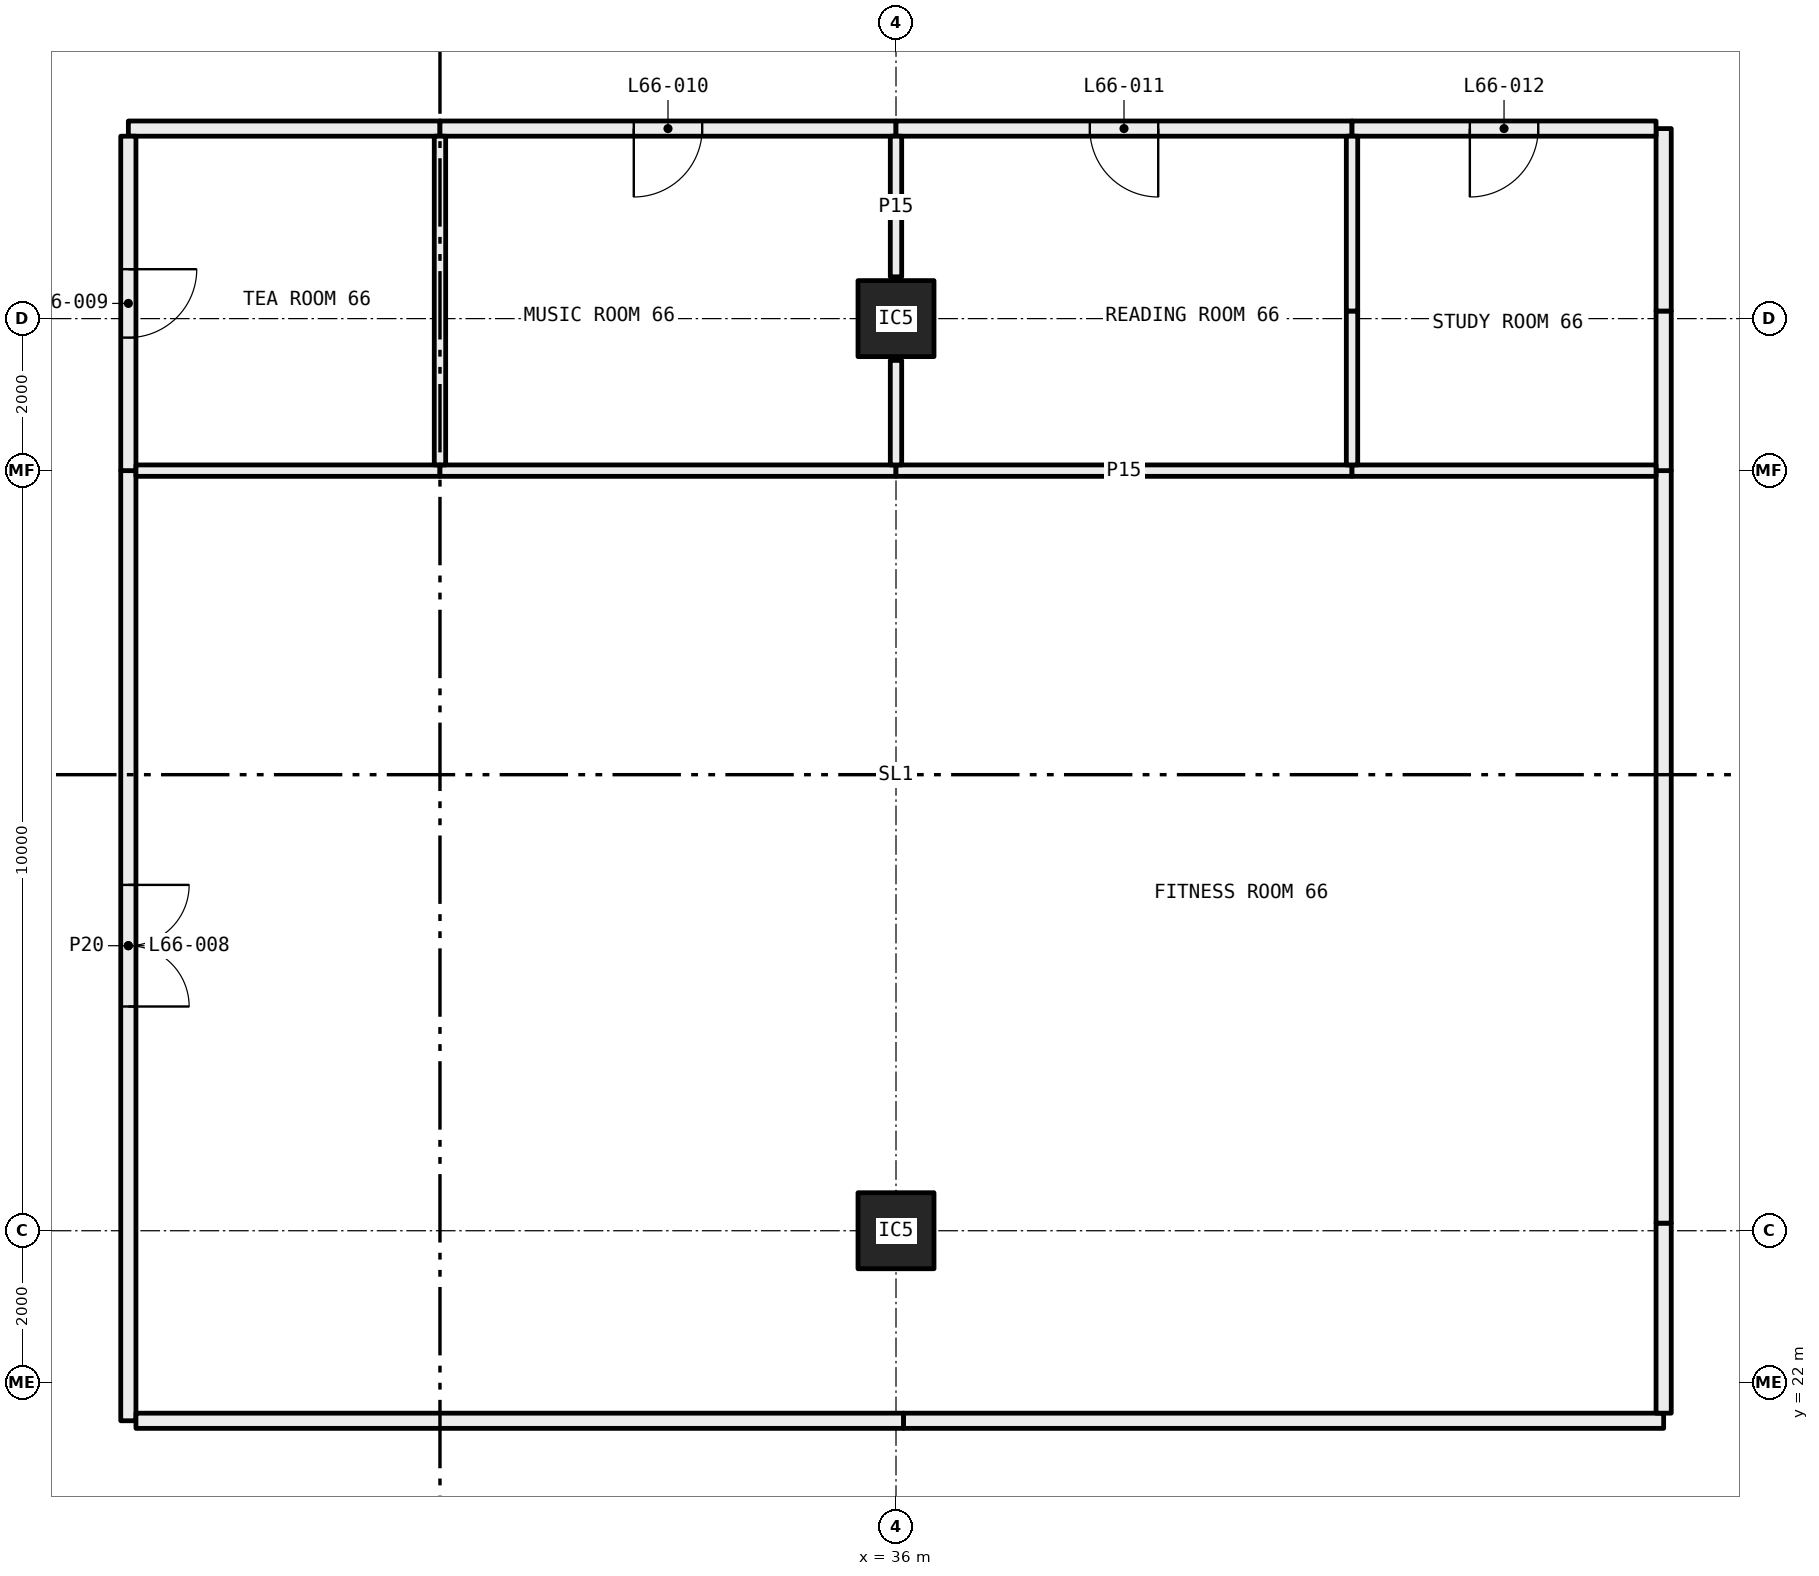
"""IFC4 building model, lengths in metres.
Left out: names, types, materials, properties, quantities, classifications, styles, units other than length and angle.
Written with IfcOpenShell. Run it as: python <this file> out.ifc"""

import sys

from ifc_helpers import new_model, si_unit, direction, frame, frame_2d, origin, origin_2d, place, context, subcontext, project, spatial, rectangle, hollow_rectangle, extrude, element, fill, save


model = new_model("IFC4")
c1 = context("Model", 3, precision=1e-05, world=origin(), true_north=direction((0.0, 1.0)))
c2 = subcontext(c1, "Body", "Model", "MODEL_VIEW")
j1 = project(units=[si_unit("LENGTHUNIT", "METRE"), si_unit("PLANEANGLEUNIT", "RADIAN")], contexts=[c1])
p1 = place(None, origin())
s1 = spatial("IfcSite", under=j1, at=p1, CompositionType="ELEMENT")
p2 = place(p1, origin())
s2 = spatial("IfcBuilding", under=s1, at=p2, CompositionType="ELEMENT")
p3 = place(p2, frame((0.0, 0.0, 245.55)))
s3 = spatial("IfcBuildingStorey", under=s2, at=p3, CompositionType="ELEMENT", Elevation=245.55)
for number, where, z_axis, x_axis in (
    (1, (36.0, 24.0, 0.0), (0.0, 0.0, 1.0), (1.0, 0.0, 0.0)),
    (2, (36.0, 36.0, 0.0), (0.0, 0.0, 1.0), (1.0, 0.0, 0.0)),
):
    element("IfcColumn", number, at=place(p3, frame(where, z_axis=z_axis, x_axis=x_axis)), inside=s3, PredefinedType="COLUMN", context=c2, shape_type="SweptSolid", body=[
        extrude(hollow_rectangle(XDim=1.0, YDim=1.0, WallThickness=0.04, at=origin_2d()), origin(), (0.0, 0.0, 1.0), 3.05),
    ])
p4 = place(p3, frame((25.9, 34.0, 0.0), z_axis=(0.0, 0.0, 1.0), x_axis=(0.0, -1.0, 0.0)))
e3 = element("IfcWall", 3, at=p4, inside=s3, PredefinedType="PARTITIONING", context=c2, shape_type="SweptSolid", body=[
    extrude(rectangle(XDim=12.5, YDim=0.2, at=frame_2d((6.25, 0.0))), origin(), (0.0, 0.0, 1.0), 3.05),
])
p5 = place(p4, frame((5.45, 0.0, 0.0)))
e4 = element("IfcOpeningElement", 4, at=p5, cuts=e3, PredefinedType="OPENING", context=c2, shape_type="SweptSolid", body=[
    extrude(rectangle(XDim=1.6, YDim=2.1, at=frame_2d((0.8, 1.05))), frame((0.0, 0.11, 0.0), z_axis=(0.0, -1.0, 0.0), x_axis=(1.0, 0.0, 0.0)), (0.0, 0.0, 1.0), 0.22),
])
p6 = place(p3, frame((26.0, 21.5, 0.0), z_axis=(0.0, 0.0, 1.0), x_axis=(1.0, 0.0, 0.0)))
e5 = element("IfcWall", 5, at=p6, inside=s3, PredefinedType="PARTITIONING", context=c2, shape_type="SweptSolid", body=[
    extrude(rectangle(XDim=10.1, YDim=0.2, at=frame_2d((5.05, 0.0))), origin(), (0.0, 0.0, 1.0), 2.45),
])
p7 = place(p3, frame((36.1, 21.5, 0.0), z_axis=(0.0, 0.0, 1.0), x_axis=(1.0, 0.0, 0.0)))
e6 = element("IfcWall", 6, at=p7, inside=s3, PredefinedType="PARTITIONING", context=c2, shape_type="SweptSolid", body=[
    extrude(rectangle(XDim=10.0, YDim=0.2, at=frame_2d((5.0, 0.0))), origin(), (0.0, 0.0, 1.0), 3.05),
])
p8 = place(p3, frame((46.1, 21.6, 0.0), z_axis=(0.0, 0.0, 1.0), x_axis=(0.0, 1.0, 0.0)))
e7 = element("IfcWall", 7, at=p8, inside=s3, PredefinedType="PARTITIONING", context=c2, shape_type="SweptSolid", body=[
    extrude(rectangle(XDim=2.5, YDim=0.2, at=frame_2d((1.25, 0.0))), origin(), (0.0, 0.0, 1.0), 2.45),
])
p9 = place(p3, frame((46.1, 24.1, 0.0), z_axis=(0.0, 0.0, 1.0), x_axis=(0.0, 1.0, 0.0)))
e8 = element("IfcWall", 8, at=p9, inside=s3, PredefinedType="PARTITIONING", context=c2, shape_type="SweptSolid", body=[
    extrude(rectangle(XDim=9.9, YDim=0.2, at=frame_2d((4.95, 0.0))), origin(), (0.0, 0.0, 1.0), 3.05),
])
p10 = place(p3, frame((30.0, 38.5, 0.0), z_axis=(0.0, 0.0, 1.0), x_axis=(-1.0, 0.0, 0.0)))
e9 = element("IfcWall", 9, at=p10, inside=s3, PredefinedType="PARTITIONING", context=c2, shape_type="SweptSolid", body=[
    extrude(rectangle(XDim=4.1, YDim=0.2, at=frame_2d((2.05, 0.0))), origin(), (0.0, 0.0, 1.0), 3.05),
])
p11 = place(p3, frame((25.9, 38.4, 0.0), z_axis=(0.0, 0.0, 1.0), x_axis=(0.0, -1.0, 0.0)))
e10 = element("IfcWall", 10, at=p11, inside=s3, PredefinedType="PARTITIONING", context=c2, shape_type="SweptSolid", body=[
    extrude(rectangle(XDim=4.4, YDim=0.2, at=frame_2d((2.2, 0.0))), origin(), (0.0, 0.0, 1.0), 3.05),
])
p12 = place(p11, frame((1.75, 0.0, 0.0)))
e11 = element("IfcOpeningElement", 11, at=p12, cuts=e10, PredefinedType="OPENING", context=c2, shape_type="SweptSolid", body=[
    extrude(rectangle(XDim=0.9, YDim=2.1, at=frame_2d((0.45, 1.05))), frame((0.0, 0.11, 0.0), z_axis=(0.0, -1.0, 0.0), x_axis=(1.0, 0.0, 0.0)), (0.0, 0.0, 1.0), 0.22),
])
p13 = place(p3, frame((36.0, 38.5, 0.0), z_axis=(0.0, 0.0, 1.0), x_axis=(-1.0, 0.0, 0.0)))
e12 = element("IfcWall", 12, at=p13, inside=s3, PredefinedType="PARTITIONING", context=c2, shape_type="SweptSolid", body=[
    extrude(rectangle(XDim=6.0, YDim=0.2, at=frame_2d((3.0, 0.0))), origin(), (0.0, 0.0, 1.0), 2.45),
])
p14 = place(p13, frame((2.55, 0.0, 0.0)))
e13 = element("IfcOpeningElement", 13, at=p14, cuts=e12, PredefinedType="OPENING", context=c2, shape_type="SweptSolid", body=[
    extrude(rectangle(XDim=0.9, YDim=2.1, at=frame_2d((0.45, 1.05))), frame((0.0, 0.11, 0.0), z_axis=(0.0, -1.0, 0.0), x_axis=(1.0, 0.0, 0.0)), (0.0, 0.0, 1.0), 0.22),
])
p15 = place(p3, frame((42.0, 38.5, 0.0), z_axis=(0.0, 0.0, 1.0), x_axis=(-1.0, 0.0, 0.0)))
e14 = element("IfcWall", 14, at=p15, inside=s3, PredefinedType="PARTITIONING", context=c2, shape_type="SweptSolid", body=[
    extrude(rectangle(XDim=6.0, YDim=0.2, at=frame_2d((3.0, 0.0))), origin(), (0.0, 0.0, 1.0), 2.45),
])
p16 = place(p15, frame((2.55, 0.0, 0.0)))
e15 = element("IfcOpeningElement", 15, at=p16, cuts=e14, PredefinedType="OPENING", context=c2, shape_type="SweptSolid", body=[
    extrude(rectangle(XDim=0.9, YDim=2.1, at=frame_2d((0.45, 1.05))), frame((0.0, 0.11, 0.0), z_axis=(0.0, -1.0, 0.0), x_axis=(1.0, 0.0, 0.0)), (0.0, 0.0, 1.0), 0.22),
])
p17 = place(p3, frame((46.1, 34.0, 0.0), z_axis=(0.0, 0.0, 1.0), x_axis=(0.0, 1.0, 0.0)))
e16 = element("IfcWall", 16, at=p17, inside=s3, PredefinedType="PARTITIONING", context=c2, shape_type="SweptSolid", body=[
    extrude(rectangle(XDim=2.1, YDim=0.2, at=frame_2d((1.05, 0.0))), origin(), (0.0, 0.0, 1.0), 2.45),
])
p18 = place(p3, frame((46.1, 36.1, 0.0), z_axis=(0.0, 0.0, 1.0), x_axis=(0.0, 1.0, 0.0)))
e17 = element("IfcWall", 17, at=p18, inside=s3, PredefinedType="PARTITIONING", context=c2, shape_type="SweptSolid", body=[
    extrude(rectangle(XDim=2.4, YDim=0.2, at=frame_2d((1.2, 0.0))), origin(), (0.0, 0.0, 1.0), 3.05),
])
p19 = place(p3, frame((46.0, 38.5, 0.0), z_axis=(0.0, 0.0, 1.0), x_axis=(-1.0, 0.0, 0.0)))
e18 = element("IfcWall", 18, at=p19, inside=s3, PredefinedType="PARTITIONING", context=c2, shape_type="SweptSolid", body=[
    extrude(rectangle(XDim=4.0, YDim=0.2, at=frame_2d((2.0, 0.0))), origin(), (0.0, 0.0, 1.0), 3.05),
])
p20 = place(p19, frame((1.55, 0.0, 0.0)))
e19 = element("IfcOpeningElement", 19, at=p20, cuts=e18, PredefinedType="OPENING", context=c2, shape_type="SweptSolid", body=[
    extrude(rectangle(XDim=0.9, YDim=2.1, at=frame_2d((0.45, 1.05))), frame((0.0, 0.11, 0.0), z_axis=(0.0, -1.0, 0.0), x_axis=(1.0, 0.0, 0.0)), (0.0, 0.0, 1.0), 0.22),
])
p21 = place(p3, frame((30.0, 34.0, 0.0), z_axis=(0.0, 0.0, 1.0), x_axis=(-1.0, 0.0, 0.0)))
e20 = element("IfcWall", 20, at=p21, inside=s3, PredefinedType="PARTITIONING", context=c2, shape_type="SweptSolid", body=[
    extrude(rectangle(XDim=4.0, YDim=0.15, at=frame_2d((2.0, 0.0))), origin(), (0.0, 0.0, 1.0), 3.05),
])
for number, where, z_axis, x_axis in (
    (21, (36.0, 34.0, 0.0), (0.0, 0.0, 1.0), (-1.0, 0.0, 0.0)),
    (22, (42.0, 34.0, 0.0), (0.0, 0.0, 1.0), (-1.0, 0.0, 0.0)),
):
    element("IfcWall", number, at=place(p3, frame(where, z_axis=z_axis, x_axis=x_axis)), inside=s3, PredefinedType="PARTITIONING", context=c2, shape_type="SweptSolid", body=[
        extrude(rectangle(XDim=6.0, YDim=0.15, at=frame_2d((3.0, 0.0))), origin(), (0.0, 0.0, 1.0), 2.45),
    ])
p22 = place(p3, frame((46.0, 34.0, 0.0), z_axis=(0.0, 0.0, 1.0), x_axis=(-1.0, 0.0, 0.0)))
e23 = element("IfcWall", 23, at=p22, inside=s3, PredefinedType="PARTITIONING", context=c2, shape_type="SweptSolid", body=[
    extrude(rectangle(XDim=4.0, YDim=0.15, at=frame_2d((2.0, 0.0))), origin(), (0.0, 0.0, 1.0), 3.05),
])
p23 = place(p3, frame((30.0, 34.075, 0.0), z_axis=(0.0, 0.0, 1.0), x_axis=(0.0, 1.0, 0.0)))
e24 = element("IfcWall", 24, at=p23, inside=s3, PredefinedType="PARTITIONING", context=c2, shape_type="SweptSolid", body=[
    extrude(rectangle(XDim=4.325, YDim=0.15, at=frame_2d((2.163, 0.0))), origin(), (0.0, 0.0, 1.0), 3.05),
])
p24 = place(p3, frame((36.0, 34.075, 0.0), z_axis=(0.0, 0.0, 1.0), x_axis=(0.0, 1.0, 0.0)))
e25 = element("IfcWall", 25, at=p24, inside=s3, PredefinedType="PARTITIONING", context=c2, shape_type="SweptSolid", body=[
    extrude(rectangle(XDim=1.375, YDim=0.15, at=frame_2d((0.688, 0.0))), origin(), (0.0, 0.0, 1.0), 2.45),
])
p25 = place(p3, frame((36.0, 36.55, 0.0), z_axis=(0.0, 0.0, 1.0), x_axis=(0.0, 1.0, 0.0)))
e26 = element("IfcWall", 26, at=p25, inside=s3, PredefinedType="PARTITIONING", context=c2, shape_type="SweptSolid", body=[
    extrude(rectangle(XDim=1.85, YDim=0.15, at=frame_2d((0.925, 0.0))), origin(), (0.0, 0.0, 1.0), 2.45),
])
p26 = place(p3, frame((42.0, 34.075, 0.0), z_axis=(0.0, 0.0, 1.0), x_axis=(0.0, 1.0, 0.0)))
e27 = element("IfcWall", 27, at=p26, inside=s3, PredefinedType="PARTITIONING", context=c2, shape_type="SweptSolid", body=[
    extrude(rectangle(XDim=2.025, YDim=0.15, at=frame_2d((1.013, 0.0))), origin(), (0.0, 0.0, 1.0), 2.45),
])
p27 = place(p3, frame((42.0, 36.1, 0.0), z_axis=(0.0, 0.0, 1.0), x_axis=(0.0, 1.0, 0.0)))
e28 = element("IfcWall", 28, at=p27, inside=s3, PredefinedType="PARTITIONING", context=c2, shape_type="SweptSolid", body=[
    extrude(rectangle(XDim=2.3, YDim=0.15, at=frame_2d((1.15, 0.0))), origin(), (0.0, 0.0, 1.0), 3.05),
])
p28 = place(p5, origin())
e29 = element("IfcDoor", 29, at=p28, inside=s3, OperationType="DOUBLE_DOOR_SINGLE_SWING", PredefinedType="DOOR", context=c2, shape_type="SweptSolid", body=[
    extrude(rectangle(XDim=1.6, YDim=2.1, at=frame_2d((0.8, 1.05))), frame((0.0, 0.025, 0.0), z_axis=(0.0, -1.0, 0.0), x_axis=(1.0, 0.0, 0.0)), (0.0, 0.0, 1.0), 0.05),
])
fill(e4, e29)
p29 = place(p12, origin())
e30 = element("IfcDoor", 30, at=p29, inside=s3, OperationType="SINGLE_SWING_RIGHT", PredefinedType="DOOR", context=c2, shape_type="SweptSolid", body=[
    extrude(rectangle(XDim=0.9, YDim=2.1, at=frame_2d((0.45, 1.05))), frame((0.0, 0.025, 0.0), z_axis=(0.0, -1.0, 0.0), x_axis=(1.0, 0.0, 0.0)), (0.0, 0.0, 1.0), 0.05),
])
fill(e11, e30)
p30 = place(p14, origin())
e31 = element("IfcDoor", 31, at=p30, inside=s3, OperationType="SINGLE_SWING_LEFT", PredefinedType="DOOR", context=c2, shape_type="SweptSolid", body=[
    extrude(rectangle(XDim=0.9, YDim=2.1, at=frame_2d((0.45, 1.05))), frame((0.0, 0.025, 0.0), z_axis=(0.0, -1.0, 0.0), x_axis=(1.0, 0.0, 0.0)), (0.0, 0.0, 1.0), 0.05),
])
fill(e13, e31)
p31 = place(p16, origin())
e32 = element("IfcDoor", 32, at=p31, inside=s3, OperationType="SINGLE_SWING_RIGHT", PredefinedType="DOOR", context=c2, shape_type="SweptSolid", body=[
    extrude(rectangle(XDim=0.9, YDim=2.1, at=frame_2d((0.45, 1.05))), frame((0.0, 0.025, 0.0), z_axis=(0.0, -1.0, 0.0), x_axis=(1.0, 0.0, 0.0)), (0.0, 0.0, 1.0), 0.05),
])
fill(e15, e32)
p32 = place(p20, origin())
e33 = element("IfcDoor", 33, at=p32, inside=s3, OperationType="SINGLE_SWING_LEFT", PredefinedType="DOOR", context=c2, shape_type="SweptSolid", body=[
    extrude(rectangle(XDim=0.9, YDim=2.1, at=frame_2d((0.45, 1.05))), frame((0.0, 0.025, 0.0), z_axis=(0.0, -1.0, 0.0), x_axis=(1.0, 0.0, 0.0)), (0.0, 0.0, 1.0), 0.05),
])
fill(e19, e33)
save(model, sys.argv[1])
